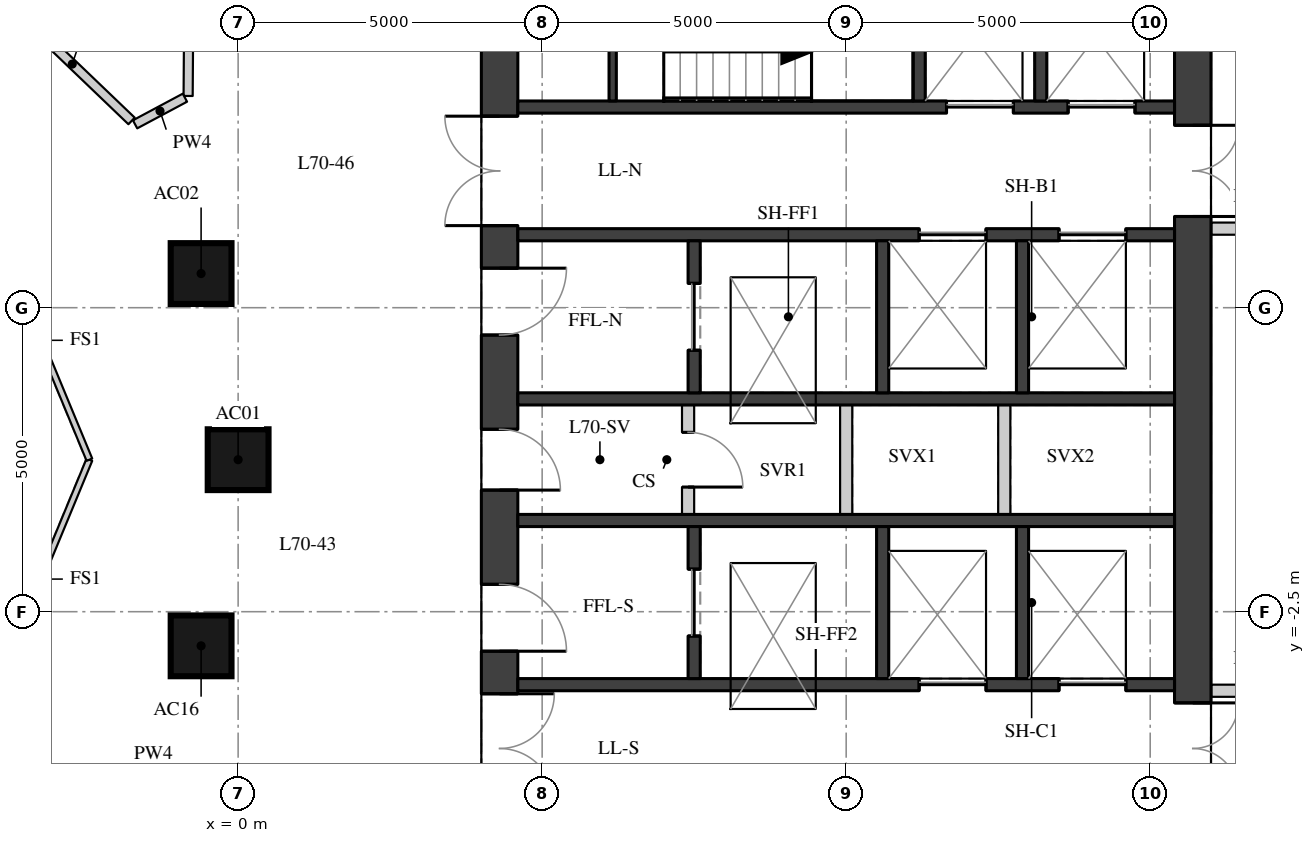
"""IFC4 building model, lengths in metres.
Left out: names, types, materials, properties, quantities, classifications, styles, units other than length and angle.
Written with IfcOpenShell. Run it as: python <this file> out.ifc"""

import sys

from ifc_helpers import new_model, si_unit, direction, frame, frame_2d, origin, origin_2d, place, context, subcontext, project, spatial, rectangle, extrude, element, fill, save


model = new_model("IFC4")
c1 = context("Model", 3, precision=1e-05, world=origin(), true_north=direction((0.0, 1.0)))
c2 = subcontext(c1, "Body", "Model", "MODEL_VIEW")
j1 = project(units=[si_unit("LENGTHUNIT", "METRE"), si_unit("PLANEANGLEUNIT", "RADIAN")], contexts=[c1])
p1 = place(None, origin())
s1 = spatial("IfcSite", under=j1, at=p1, CompositionType="ELEMENT")
p2 = place(p1, origin())
s2 = spatial("IfcBuilding", under=s1, at=p2, CompositionType="ELEMENT")
p3 = place(p2, frame((0.0, 0.0, 246.5)))
s3 = spatial("IfcBuildingStorey", under=s2, at=p3, CompositionType="ELEMENT", Elevation=246.5)
for number, where, z_axis, x_axis in (
    (1, (0.0, 0.0, 0.0), (0.0, 0.0, 1.0), (1.0, 0.0, 0.0)),
    (2, (-0.609, 3.062, 0.0), (0.0, 0.0, 1.0), (1.0, 0.0, 0.0)),
    (3, (-0.609, -3.062, 0.0), (0.0, 0.0, 1.0), (1.0, 0.0, 0.0)),
):
    element("IfcColumn", number, at=place(p3, frame(where, z_axis=z_axis, x_axis=x_axis)), inside=s3, PredefinedType="COLUMN", context=c2, shape_type="SweptSolid", body=[
        extrude(rectangle(XDim=1.0, YDim=1.0, at=origin_2d()), origin(), (0.0, 0.0, 1.0), 3.3),
    ])
p4 = place(p3, frame((4.3, -9.4, 0.0), z_axis=(0.0, 0.0, 1.0), x_axis=(0.0, 1.0, 0.0)))
e4 = element("IfcWall", 4, at=p4, inside=s3, PredefinedType="SHEAR", context=c2, shape_type="SweptSolid", body=[
    extrude(rectangle(XDim=18.8, YDim=0.6, at=frame_2d((9.4, 0.0))), origin(), (0.0, 0.0, 1.0), 3.02),
])
p5 = place(p4, frame((0.65, 0.0, 0.0)))
e5 = element("IfcOpeningElement", 5, at=p5, cuts=e4, PredefinedType="OPENING", context=c2, shape_type="SweptSolid", body=[
    extrude(rectangle(XDim=1.5, YDim=2.1, at=frame_2d((0.75, 1.05))), frame((0.0, 0.31, 0.0), z_axis=(0.0, -1.0, 0.0), x_axis=(1.0, 0.0, 0.0)), (0.0, 0.0, 1.0), 0.62),
])
p6 = place(p4, frame((3.75, 0.0, 0.0)))
e6 = element("IfcOpeningElement", 6, at=p6, cuts=e4, PredefinedType="OPENING", context=c2, shape_type="SweptSolid", body=[
    extrude(rectangle(XDim=1.8, YDim=2.1, at=frame_2d((0.9, 1.05))), frame((0.0, 0.31, 0.0), z_axis=(0.0, -1.0, 0.0), x_axis=(1.0, 0.0, 0.0)), (0.0, 0.0, 1.0), 0.62),
])
p7 = place(p4, frame((6.25, 0.0, 0.0)))
e7 = element("IfcOpeningElement", 7, at=p7, cuts=e4, PredefinedType="OPENING", context=c2, shape_type="SweptSolid", body=[
    extrude(rectangle(XDim=1.1, YDim=2.1, at=frame_2d((0.55, 1.05))), frame((0.0, 0.31, 0.0), z_axis=(0.0, -1.0, 0.0), x_axis=(1.0, 0.0, 0.0)), (0.0, 0.0, 1.0), 0.62),
])
p8 = place(p4, frame((8.9, 0.0, 0.0)))
e8 = element("IfcOpeningElement", 8, at=p8, cuts=e4, PredefinedType="OPENING", context=c2, shape_type="SweptSolid", body=[
    extrude(rectangle(XDim=1.0, YDim=2.1, at=frame_2d((0.5, 1.05))), frame((0.0, 0.31, 0.0), z_axis=(0.0, -1.0, 0.0), x_axis=(1.0, 0.0, 0.0)), (0.0, 0.0, 1.0), 0.62),
])
p9 = place(p4, frame((11.45, 0.0, 0.0)))
e9 = element("IfcOpeningElement", 9, at=p9, cuts=e4, PredefinedType="OPENING", context=c2, shape_type="SweptSolid", body=[
    extrude(rectangle(XDim=1.1, YDim=2.1, at=frame_2d((0.55, 1.05))), frame((0.0, 0.31, 0.0), z_axis=(0.0, -1.0, 0.0), x_axis=(1.0, 0.0, 0.0)), (0.0, 0.0, 1.0), 0.62),
])
p10 = place(p4, frame((13.25, 0.0, 0.0)))
e10 = element("IfcOpeningElement", 10, at=p10, cuts=e4, PredefinedType="OPENING", context=c2, shape_type="SweptSolid", body=[
    extrude(rectangle(XDim=1.8, YDim=2.1, at=frame_2d((0.9, 1.05))), frame((0.0, 0.31, 0.0), z_axis=(0.0, -1.0, 0.0), x_axis=(1.0, 0.0, 0.0)), (0.0, 0.0, 1.0), 0.62),
])
p11 = place(p4, frame((16.65, 0.0, 0.0)))
e11 = element("IfcOpeningElement", 11, at=p11, cuts=e4, PredefinedType="OPENING", context=c2, shape_type="SweptSolid", body=[
    extrude(rectangle(XDim=1.5, YDim=2.1, at=frame_2d((0.75, 1.05))), frame((0.0, 0.31, 0.0), z_axis=(0.0, -1.0, 0.0), x_axis=(1.0, 0.0, 0.0)), (0.0, 0.0, 1.0), 0.62),
])
p12 = place(p3, frame((15.7, -9.4, 0.0), z_axis=(0.0, 0.0, 1.0), x_axis=(0.0, 1.0, 0.0)))
e12 = element("IfcWall", 12, at=p12, inside=s3, PredefinedType="SHEAR", context=c2, shape_type="SweptSolid", body=[
    extrude(rectangle(XDim=18.8, YDim=0.6, at=frame_2d((9.4, 0.0))), origin(), (0.0, 0.0, 1.0), 3.02),
])
p13 = place(p12, frame((13.4, 0.0, 0.0)))
e13 = element("IfcOpeningElement", 13, at=p13, cuts=e12, PredefinedType="OPENING", context=c2, shape_type="SweptSolid", body=[
    extrude(rectangle(XDim=1.5, YDim=2.1, at=frame_2d((0.75, 1.05))), frame((0.0, 0.31, 0.0), z_axis=(0.0, -1.0, 0.0), x_axis=(1.0, 0.0, 0.0)), (0.0, 0.0, 1.0), 0.62),
])
p14 = place(p12, frame((3.9, 0.0, 0.0)))
e14 = element("IfcOpeningElement", 14, at=p14, cuts=e12, PredefinedType="OPENING", context=c2, shape_type="SweptSolid", body=[
    extrude(rectangle(XDim=1.5, YDim=2.1, at=frame_2d((0.75, 1.05))), frame((0.0, 0.31, 0.0), z_axis=(0.0, -1.0, 0.0), x_axis=(1.0, 0.0, 0.0)), (0.0, 0.0, 1.0), 0.62),
])
p15 = place(p3, frame((4.6, 5.8, 0.0), z_axis=(0.0, 0.0, 1.0), x_axis=(1.0, 0.0, 0.0)))
e15 = element("IfcWall", 15, at=p15, inside=s3, PredefinedType="SHEAR", context=c2, shape_type="SweptSolid", body=[
    extrude(rectangle(XDim=10.8, YDim=0.2, at=frame_2d((5.4, 0.0))), origin(), (0.0, 0.0, 1.0), 3.02),
])
p16 = place(p15, frame((7.05, 0.0, 0.0)))
e16 = element("IfcOpeningElement", 16, at=p16, cuts=e15, PredefinedType="OPENING", context=c2, shape_type="SweptSolid", body=[
    extrude(rectangle(XDim=1.1, YDim=2.1, at=frame_2d((0.55, 1.05))), frame((0.0, 0.11, 0.0), z_axis=(0.0, -1.0, 0.0), x_axis=(1.0, 0.0, 0.0)), (0.0, 0.0, 1.0), 0.22),
])
p17 = place(p15, frame((9.05, 0.0, 0.0)))
e17 = element("IfcOpeningElement", 17, at=p17, cuts=e15, PredefinedType="OPENING", context=c2, shape_type="SweptSolid", body=[
    extrude(rectangle(XDim=1.1, YDim=2.1, at=frame_2d((0.55, 1.05))), frame((0.0, 0.11, 0.0), z_axis=(0.0, -1.0, 0.0), x_axis=(1.0, 0.0, 0.0)), (0.0, 0.0, 1.0), 0.22),
])
p18 = place(p3, frame((4.6, 3.7, 0.0), z_axis=(0.0, 0.0, 1.0), x_axis=(1.0, 0.0, 0.0)))
e18 = element("IfcWall", 18, at=p18, inside=s3, PredefinedType="SHEAR", context=c2, shape_type="SweptSolid", body=[
    extrude(rectangle(XDim=10.8, YDim=0.2, at=frame_2d((5.4, 0.0))), origin(), (0.0, 0.0, 1.0), 3.02),
])
p19 = place(p18, frame((6.6, 0.0, 0.0)))
e19 = element("IfcOpeningElement", 19, at=p19, cuts=e18, PredefinedType="OPENING", context=c2, shape_type="SweptSolid", body=[
    extrude(rectangle(XDim=1.1, YDim=2.1, at=frame_2d((0.55, 1.05))), frame((0.0, 0.11, 0.0), z_axis=(0.0, -1.0, 0.0), x_axis=(1.0, 0.0, 0.0)), (0.0, 0.0, 1.0), 0.22),
])
p20 = place(p18, frame((8.9, 0.0, 0.0)))
e20 = element("IfcOpeningElement", 20, at=p20, cuts=e18, PredefinedType="OPENING", context=c2, shape_type="SweptSolid", body=[
    extrude(rectangle(XDim=1.1, YDim=2.1, at=frame_2d((0.55, 1.05))), frame((0.0, 0.11, 0.0), z_axis=(0.0, -1.0, 0.0), x_axis=(1.0, 0.0, 0.0)), (0.0, 0.0, 1.0), 0.22),
])
for number, where, z_axis, x_axis in (
    (21, (4.6, 1.0, 0.0), (0.0, 0.0, 1.0), (1.0, 0.0, 0.0)),
    (22, (4.6, -1.0, 0.0), (0.0, 0.0, 1.0), (1.0, 0.0, 0.0)),
):
    element("IfcWall", number, at=place(p3, frame(where, z_axis=z_axis, x_axis=x_axis)), inside=s3, PredefinedType="SHEAR", context=c2, shape_type="SweptSolid", body=[
        extrude(rectangle(XDim=10.8, YDim=0.2, at=frame_2d((5.4, 0.0))), origin(), (0.0, 0.0, 1.0), 3.02),
    ])
p21 = place(p3, frame((4.6, -3.7, 0.0), z_axis=(0.0, 0.0, 1.0), x_axis=(1.0, 0.0, 0.0)))
e23 = element("IfcWall", 23, at=p21, inside=s3, PredefinedType="SHEAR", context=c2, shape_type="SweptSolid", body=[
    extrude(rectangle(XDim=10.8, YDim=0.2, at=frame_2d((5.4, 0.0))), origin(), (0.0, 0.0, 1.0), 3.02),
])
p22 = place(p21, frame((6.6, 0.0, 0.0)))
e24 = element("IfcOpeningElement", 24, at=p22, cuts=e23, PredefinedType="OPENING", context=c2, shape_type="SweptSolid", body=[
    extrude(rectangle(XDim=1.1, YDim=2.1, at=frame_2d((0.55, 1.05))), frame((0.0, 0.11, 0.0), z_axis=(0.0, -1.0, 0.0), x_axis=(1.0, 0.0, 0.0)), (0.0, 0.0, 1.0), 0.22),
])
p23 = place(p21, frame((8.9, 0.0, 0.0)))
e25 = element("IfcOpeningElement", 25, at=p23, cuts=e23, PredefinedType="OPENING", context=c2, shape_type="SweptSolid", body=[
    extrude(rectangle(XDim=1.1, YDim=2.1, at=frame_2d((0.55, 1.05))), frame((0.0, 0.11, 0.0), z_axis=(0.0, -1.0, 0.0), x_axis=(1.0, 0.0, 0.0)), (0.0, 0.0, 1.0), 0.22),
])
for number, where, z_axis, x_axis in (
    (26, (11.2, 5.9, 0.0), (0.0, 0.0, 1.0), (0.0, 1.0, 0.0)),
    (27, (13.2, 5.9, 0.0), (0.0, 0.0, 1.0), (0.0, 1.0, 0.0)),
):
    element("IfcWall", number, at=place(p3, frame(where, z_axis=z_axis, x_axis=x_axis)), inside=s3, PredefinedType="SHEAR", context=c2, shape_type="SweptSolid", body=[
        extrude(rectangle(XDim=3.5, YDim=0.2, at=frame_2d((1.75, 0.0))), origin(), (0.0, 0.0, 1.0), 3.02),
    ])
p24 = place(p3, frame((7.5, 1.1, 0.0), z_axis=(0.0, 0.0, 1.0), x_axis=(0.0, 1.0, 0.0)))
e28 = element("IfcWall", 28, at=p24, inside=s3, PredefinedType="SHEAR", context=c2, shape_type="SweptSolid", body=[
    extrude(rectangle(XDim=2.5, YDim=0.2, at=frame_2d((1.25, 0.0))), origin(), (0.0, 0.0, 1.0), 3.02),
])
p25 = place(p24, frame((0.7, 0.0, 0.0)))
e29 = element("IfcOpeningElement", 29, at=p25, cuts=e28, PredefinedType="OPENING", context=c2, shape_type="SweptSolid", body=[
    extrude(rectangle(XDim=1.1, YDim=2.1, at=frame_2d((0.55, 1.05))), frame((0.0, 0.11, 0.0), z_axis=(0.0, -1.0, 0.0), x_axis=(1.0, 0.0, 0.0)), (0.0, 0.0, 1.0), 0.22),
])
p26 = place(p3, frame((7.5, -3.6, 0.0), z_axis=(0.0, 0.0, 1.0), x_axis=(0.0, 1.0, 0.0)))
e30 = element("IfcWall", 30, at=p26, inside=s3, PredefinedType="SHEAR", context=c2, shape_type="SweptSolid", body=[
    extrude(rectangle(XDim=2.5, YDim=0.2, at=frame_2d((1.25, 0.0))), origin(), (0.0, 0.0, 1.0), 3.02),
])
p27 = place(p26, frame((0.7, 0.0, 0.0)))
e31 = element("IfcOpeningElement", 31, at=p27, cuts=e30, PredefinedType="OPENING", context=c2, shape_type="SweptSolid", body=[
    extrude(rectangle(XDim=1.1, YDim=2.1, at=frame_2d((0.55, 1.05))), frame((0.0, 0.11, 0.0), z_axis=(0.0, -1.0, 0.0), x_axis=(1.0, 0.0, 0.0)), (0.0, 0.0, 1.0), 0.22),
])
for number, where, z_axis, x_axis in (
    (32, (10.6, 1.1, 0.0), (0.0, 0.0, 1.0), (0.0, 1.0, 0.0)),
    (33, (10.6, -3.6, 0.0), (0.0, 0.0, 1.0), (0.0, 1.0, 0.0)),
    (34, (12.9, 1.1, 0.0), (0.0, 0.0, 1.0), (0.0, 1.0, 0.0)),
    (35, (12.9, -3.6, 0.0), (0.0, 0.0, 1.0), (0.0, 1.0, 0.0)),
):
    element("IfcWall", number, at=place(p3, frame(where, z_axis=z_axis, x_axis=x_axis)), inside=s3, PredefinedType="SHEAR", context=c2, shape_type="SweptSolid", body=[
        extrude(rectangle(XDim=2.5, YDim=0.2, at=frame_2d((1.25, 0.0))), origin(), (0.0, 0.0, 1.0), 3.02),
    ])
p28 = place(p3, frame((6.16, 5.9, 0.0), z_axis=(0.0, 0.0, 1.0), x_axis=(0.0, 1.0, 0.0)))
e36 = element("IfcWall", 36, at=p28, inside=s3, PredefinedType="SHEAR", context=c2, shape_type="SweptSolid", body=[
    extrude(rectangle(XDim=3.5, YDim=0.12, at=frame_2d((1.75, 0.0))), origin(), (0.0, 0.0, 1.0), 3.02),
])
p29 = place(p28, frame((0.85, 0.0, 0.0)))
e37 = element("IfcOpeningElement", 37, at=p29, cuts=e36, PredefinedType="OPENING", context=c2, shape_type="SweptSolid", body=[
    extrude(rectangle(XDim=1.5, YDim=2.1, at=frame_2d((0.75, 1.05))), frame((0.0, 0.07, 0.0), z_axis=(0.0, -1.0, 0.0), x_axis=(1.0, 0.0, 0.0)), (0.0, 0.0, 1.0), 0.14),
])
p30 = place(p3, frame((7.4, -0.9, 0.0), z_axis=(0.0, 0.0, 1.0), x_axis=(0.0, 1.0, 0.0)))
e38 = element("IfcWall", 38, at=p30, inside=s3, PredefinedType="PARTITIONING", context=c2, shape_type="SweptSolid", body=[
    extrude(rectangle(XDim=1.8, YDim=0.2, at=frame_2d((0.9, 0.0))), origin(), (0.0, 0.0, 1.0), 3.02),
])
p31 = place(p30, frame((0.45, 0.0, 0.0)))
e39 = element("IfcOpeningElement", 39, at=p31, cuts=e38, PredefinedType="OPENING", context=c2, shape_type="SweptSolid", body=[
    extrude(rectangle(XDim=0.9, YDim=2.1, at=frame_2d((0.45, 1.05))), frame((0.0, 0.11, 0.0), z_axis=(0.0, -1.0, 0.0), x_axis=(1.0, 0.0, 0.0)), (0.0, 0.0, 1.0), 0.22),
])
for number, where, z_axis, x_axis in (
    (40, (10.0, -0.9, 0.0), (0.0, 0.0, 1.0), (0.0, 1.0, 0.0)),
    (41, (12.6, -0.9, 0.0), (0.0, 0.0, 1.0), (0.0, 1.0, 0.0)),
):
    element("IfcWall", number, at=place(p3, frame(where, z_axis=z_axis, x_axis=x_axis)), inside=s3, PredefinedType="PARTITIONING", context=c2, shape_type="SweptSolid", body=[
        extrude(rectangle(XDim=1.8, YDim=0.2, at=frame_2d((0.9, 0.0))), origin(), (0.0, 0.0, 1.0), 3.02),
    ])
for number, where, z_axis, x_axis in (
    (42, (17.6, 3.8, 0.0), (0.0, 0.0, 1.0), (-1.0, 0.0, 0.0)),
    (43, (16.004, -3.8, 0.0), (0.0, 0.0, 1.0), (1.0, 0.0, 0.0)),
):
    element("IfcWall", number, at=place(p3, frame(where, z_axis=z_axis, x_axis=x_axis)), inside=s3, PredefinedType="PARTITIONING", context=c2, shape_type="SweptSolid", body=[
        extrude(rectangle(XDim=1.596, YDim=0.2, at=frame_2d((0.798, 0.0))), origin(), (0.0, 0.0, 1.0), 2.57),
    ])
p32 = place(p3, frame((-0.801, 9.07, 0.0), z_axis=(0.0, 0.0, 1.0), x_axis=(-0.006879482938, -0.999976336077, 0.0)))
e44 = element("IfcWall", 44, at=p32, inside=s3, PredefinedType="PARTITIONING", context=c2, shape_type="SweptSolid", body=[
    extrude(rectangle(XDim=3.087, YDim=0.15, at=frame_2d((1.544, 0.0))), origin(), (0.0, 0.0, 1.0), 3.02),
])
p33 = place(p3, frame((-0.875, 5.954, 0.0), z_axis=(0.0, 0.0, 1.0), x_axis=(-0.882018256262, -0.471215232798, 0.0)))
e45 = element("IfcWall", 45, at=p33, inside=s3, PredefinedType="PARTITIONING", context=c2, shape_type="SweptSolid", body=[
    extrude(rectangle(XDim=0.929, YDim=0.15, at=frame_2d((0.465, 0.0))), origin(), (0.0, 0.0, 1.0), 3.02),
])
p34 = place(p3, frame((-1.752, 5.572, 0.0), z_axis=(0.0, 0.0, 1.0), x_axis=(-0.721943077846, 0.691952449487, 0.0)))
e46 = element("IfcWall", 46, at=p34, inside=s3, PredefinedType="PARTITIONING", context=c2, shape_type="SweptSolid", body=[
    extrude(rectangle(XDim=2.703, YDim=0.15, at=frame_2d((1.351, 0.0))), origin(), (0.0, 0.0, 1.0), 3.02),
])
for number, where, z_axis, x_axis in (
    (47, (-2.446, 0.0, 0.0), (0.0, 0.0, 1.0), (-0.383, -0.924, 0.0)),
    (48, (-4.073, 3.927, 0.0), (0.0, 0.0, 1.0), (0.383, -0.924, 0.0)),
):
    element("IfcWall", number, at=place(p3, frame(where, z_axis=z_axis, x_axis=x_axis)), inside=s3, PredefinedType="PARTITIONING", context=c2, shape_type="SweptSolid", body=[
        extrude(rectangle(XDim=4.251, YDim=0.1, at=frame_2d((2.125, 0.0))), origin(), (0.0, 0.0, 1.0), 3.02),
    ])
p35 = place(p6, origin())
e49 = element("IfcDoor", 49, at=p35, inside=s3, OperationType="DOUBLE_DOOR_SINGLE_SWING", PredefinedType="DOOR", context=c2, shape_type="SweptSolid", body=[
    extrude(rectangle(XDim=1.8, YDim=2.1, at=frame_2d((0.9, 1.05))), frame((0.0, 0.025, 0.0), z_axis=(0.0, -1.0, 0.0), x_axis=(1.0, 0.0, 0.0)), (0.0, 0.0, 1.0), 0.05),
])
fill(e6, e49)
p36 = place(p7, origin())
e50 = element("IfcDoor", 50, at=p36, inside=s3, OperationType="SINGLE_SWING_RIGHT", PredefinedType="DOOR", context=c2, shape_type="SweptSolid", body=[
    extrude(rectangle(XDim=1.1, YDim=2.1, at=frame_2d((0.55, 1.05))), frame((0.0, 0.025, 0.0), z_axis=(0.0, -1.0, 0.0), x_axis=(1.0, 0.0, 0.0)), (0.0, 0.0, 1.0), 0.05),
])
fill(e7, e50)
p37 = place(p8, origin())
e51 = element("IfcDoor", 51, at=p37, inside=s3, OperationType="SINGLE_SWING_RIGHT", PredefinedType="DOOR", context=c2, shape_type="SweptSolid", body=[
    extrude(rectangle(XDim=1.0, YDim=2.1, at=frame_2d((0.5, 1.05))), frame((0.0, 0.025, 0.0), z_axis=(0.0, -1.0, 0.0), x_axis=(1.0, 0.0, 0.0)), (0.0, 0.0, 1.0), 0.05),
])
fill(e8, e51)
p38 = place(p9, origin())
e52 = element("IfcDoor", 52, at=p38, inside=s3, OperationType="SINGLE_SWING_LEFT", PredefinedType="DOOR", context=c2, shape_type="SweptSolid", body=[
    extrude(rectangle(XDim=1.1, YDim=2.1, at=frame_2d((0.55, 1.05))), frame((0.0, 0.025, 0.0), z_axis=(0.0, -1.0, 0.0), x_axis=(1.0, 0.0, 0.0)), (0.0, 0.0, 1.0), 0.05),
])
fill(e9, e52)
p39 = place(p10, origin())
e53 = element("IfcDoor", 53, at=p39, inside=s3, OperationType="DOUBLE_DOOR_SINGLE_SWING", PredefinedType="DOOR", context=c2, shape_type="SweptSolid", body=[
    extrude(rectangle(XDim=1.8, YDim=2.1, at=frame_2d((0.9, 1.05))), frame((0.0, 0.025, 0.0), z_axis=(0.0, -1.0, 0.0), x_axis=(1.0, 0.0, 0.0)), (0.0, 0.0, 1.0), 0.05),
])
fill(e10, e53)
p40 = place(p13, origin())
e54 = element("IfcDoor", 54, at=p40, inside=s3, OperationType="DOUBLE_DOOR_SINGLE_SWING", PredefinedType="DOOR", context=c2, shape_type="SweptSolid", body=[
    extrude(rectangle(XDim=1.5, YDim=2.1, at=frame_2d((0.75, 1.05))), frame((0.0, 0.025, 0.0), z_axis=(0.0, -1.0, 0.0), x_axis=(1.0, 0.0, 0.0)), (0.0, 0.0, 1.0), 0.05),
])
fill(e13, e54)
p41 = place(p14, origin())
e55 = element("IfcDoor", 55, at=p41, inside=s3, OperationType="DOUBLE_DOOR_SINGLE_SWING", PredefinedType="DOOR", context=c2, shape_type="SweptSolid", body=[
    extrude(rectangle(XDim=1.5, YDim=2.1, at=frame_2d((0.75, 1.05))), frame((0.0, 0.025, 0.0), z_axis=(0.0, -1.0, 0.0), x_axis=(1.0, 0.0, 0.0)), (0.0, 0.0, 1.0), 0.05),
])
fill(e14, e55)
p42 = place(p16, origin())
e56 = element("IfcDoor", 56, at=p42, inside=s3, OperationType="DOUBLE_DOOR_SLIDING", PredefinedType="DOOR", context=c2, shape_type="SweptSolid", body=[
    extrude(rectangle(XDim=1.1, YDim=2.1, at=frame_2d((0.55, 1.05))), frame((0.0, 0.025, 0.0), z_axis=(0.0, -1.0, 0.0), x_axis=(1.0, 0.0, 0.0)), (0.0, 0.0, 1.0), 0.05),
])
fill(e16, e56)
p43 = place(p17, origin())
e57 = element("IfcDoor", 57, at=p43, inside=s3, OperationType="DOUBLE_DOOR_SLIDING", PredefinedType="DOOR", context=c2, shape_type="SweptSolid", body=[
    extrude(rectangle(XDim=1.1, YDim=2.1, at=frame_2d((0.55, 1.05))), frame((0.0, 0.025, 0.0), z_axis=(0.0, -1.0, 0.0), x_axis=(1.0, 0.0, 0.0)), (0.0, 0.0, 1.0), 0.05),
])
fill(e17, e57)
p44 = place(p19, origin())
e58 = element("IfcDoor", 58, at=p44, inside=s3, OperationType="DOUBLE_DOOR_SLIDING", PredefinedType="DOOR", context=c2, shape_type="SweptSolid", body=[
    extrude(rectangle(XDim=1.1, YDim=2.1, at=frame_2d((0.55, 1.05))), frame((0.0, 0.025, 0.0), z_axis=(0.0, -1.0, 0.0), x_axis=(1.0, 0.0, 0.0)), (0.0, 0.0, 1.0), 0.05),
])
fill(e19, e58)
p45 = place(p20, origin())
e59 = element("IfcDoor", 59, at=p45, inside=s3, OperationType="DOUBLE_DOOR_SLIDING", PredefinedType="DOOR", context=c2, shape_type="SweptSolid", body=[
    extrude(rectangle(XDim=1.1, YDim=2.1, at=frame_2d((0.55, 1.05))), frame((0.0, 0.025, 0.0), z_axis=(0.0, -1.0, 0.0), x_axis=(1.0, 0.0, 0.0)), (0.0, 0.0, 1.0), 0.05),
])
fill(e20, e59)
p46 = place(p22, origin())
e60 = element("IfcDoor", 60, at=p46, inside=s3, OperationType="DOUBLE_DOOR_SLIDING", PredefinedType="DOOR", context=c2, shape_type="SweptSolid", body=[
    extrude(rectangle(XDim=1.1, YDim=2.1, at=frame_2d((0.55, 1.05))), frame((0.0, 0.025, 0.0), z_axis=(0.0, -1.0, 0.0), x_axis=(1.0, 0.0, 0.0)), (0.0, 0.0, 1.0), 0.05),
])
fill(e24, e60)
p47 = place(p23, origin())
e61 = element("IfcDoor", 61, at=p47, inside=s3, OperationType="DOUBLE_DOOR_SLIDING", PredefinedType="DOOR", context=c2, shape_type="SweptSolid", body=[
    extrude(rectangle(XDim=1.1, YDim=2.1, at=frame_2d((0.55, 1.05))), frame((0.0, 0.025, 0.0), z_axis=(0.0, -1.0, 0.0), x_axis=(1.0, 0.0, 0.0)), (0.0, 0.0, 1.0), 0.05),
])
fill(e25, e61)
p48 = place(p25, origin())
e62 = element("IfcDoor", 62, at=p48, inside=s3, OperationType="DOUBLE_DOOR_SLIDING", PredefinedType="DOOR", context=c2, shape_type="SweptSolid", body=[
    extrude(rectangle(XDim=1.1, YDim=2.1, at=frame_2d((0.55, 1.05))), frame((0.0, 0.025, 0.0), z_axis=(0.0, -1.0, 0.0), x_axis=(1.0, 0.0, 0.0)), (0.0, 0.0, 1.0), 0.05),
])
fill(e29, e62)
p49 = place(p27, origin())
e63 = element("IfcDoor", 63, at=p49, inside=s3, OperationType="DOUBLE_DOOR_SLIDING", PredefinedType="DOOR", context=c2, shape_type="SweptSolid", body=[
    extrude(rectangle(XDim=1.1, YDim=2.1, at=frame_2d((0.55, 1.05))), frame((0.0, 0.025, 0.0), z_axis=(0.0, -1.0, 0.0), x_axis=(1.0, 0.0, 0.0)), (0.0, 0.0, 1.0), 0.05),
])
fill(e31, e63)
p50 = place(p31, origin())
e64 = element("IfcDoor", 64, at=p50, inside=s3, OperationType="SINGLE_SWING_RIGHT", PredefinedType="DOOR", context=c2, shape_type="SweptSolid", body=[
    extrude(rectangle(XDim=0.9, YDim=2.1, at=frame_2d((0.45, 1.05))), frame((0.0, 0.025, 0.0), z_axis=(0.0, -1.0, 0.0), x_axis=(1.0, 0.0, 0.0)), (0.0, 0.0, 1.0), 0.05),
])
fill(e39, e64)
save(model, sys.argv[1])
